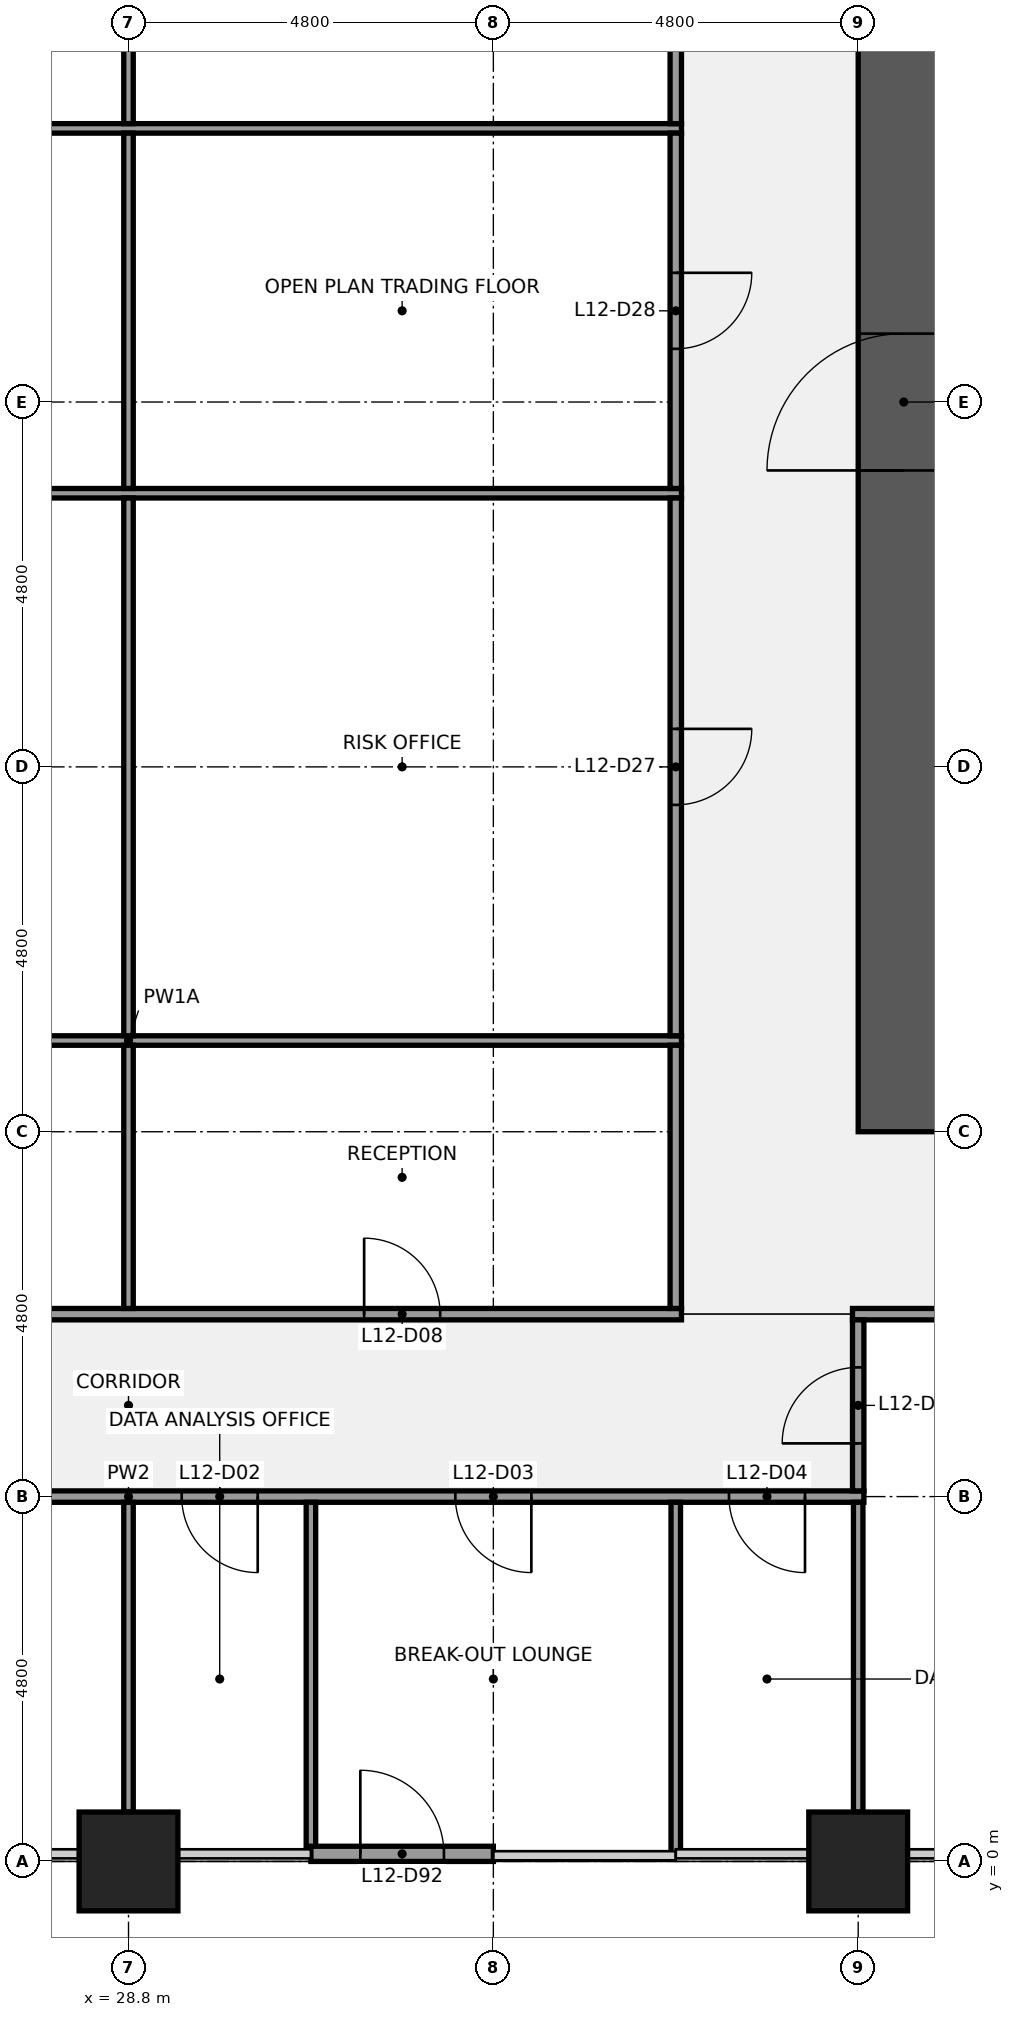
"""IFC4 building model, lengths in metres.
Left out: names, types, materials, properties, quantities, classifications, styles, units other than length and angle.
Written with IfcOpenShell. Run it as: python <this file> out.ifc"""

import sys

from ifc_helpers import new_model, si_unit, direction, frame, frame_2d, origin, origin_2d, place, context, subcontext, project, spatial, rectangle, extrude, element, fill, save


model = new_model("IFC4")
c1 = context("Model", 3, precision=1e-05, world=origin(), true_north=direction((0.0, 1.0)))
c2 = subcontext(c1, "Body", "Model", "MODEL_VIEW")
j1 = project(units=[si_unit("LENGTHUNIT", "METRE"), si_unit("PLANEANGLEUNIT", "RADIAN")], contexts=[c1])
p1 = place(None, origin())
s1 = spatial("IfcSite", under=j1, at=p1, CompositionType="ELEMENT")
p2 = place(p1, origin())
s2 = spatial("IfcBuilding", under=s1, at=p2, CompositionType="ELEMENT")
p3 = place(p2, frame((0.0, 0.0, 59.0)))
s3 = spatial("IfcBuildingStorey", under=s2, at=p3, CompositionType="ELEMENT", Elevation=59.0)
for number, where, z_axis, x_axis in (
    (1, (28.8, 0.0, 0.0), (0.0, 0.0, 1.0), (1.0, 0.0, 0.0)),
    (2, (38.4, 0.0, 0.0), (0.0, 0.0, 1.0), (1.0, 0.0, 0.0)),
):
    element("IfcColumn", number, at=place(p3, frame(where, z_axis=z_axis, x_axis=x_axis)), inside=s3, PredefinedType="COLUMN", context=c2, shape_type="SweptSolid", body=[
        extrude(rectangle(XDim=1.3, YDim=1.3, at=origin_2d()), origin(), (0.0, 0.0, 1.0), 4.0),
    ])
p4 = place(p3, frame((39.0, 9.6, 0.0), z_axis=(0.0, 0.0, 1.0), x_axis=(0.0, 1.0, 0.0)))
e3 = element("IfcWall", 3, at=p4, inside=s3, PredefinedType="SHEAR", context=c2, shape_type="SweptSolid", body=[
    extrude(rectangle(XDim=28.8, YDim=1.2, at=frame_2d((14.4, 0.0))), origin(), (0.0, 0.0, 1.0), 3.84),
])
p5 = place(p4, frame((8.7, 0.0, 0.0)))
e4 = element("IfcOpeningElement", 4, at=p5, cuts=e3, PredefinedType="OPENING", context=c2, shape_type="SweptSolid", body=[
    extrude(rectangle(XDim=1.8, YDim=2.1, at=frame_2d((0.9, 1.05))), frame((0.0, 0.61, 0.0), z_axis=(0.0, -1.0, 0.0), x_axis=(1.0, 0.0, 0.0)), (0.0, 0.0, 1.0), 1.22),
])
p6 = place(p4, frame((18.3, 0.0, 0.0)))
e5 = element("IfcOpeningElement", 5, at=p6, cuts=e3, PredefinedType="OPENING", context=c2, shape_type="SweptSolid", body=[
    extrude(rectangle(XDim=1.8, YDim=2.1, at=frame_2d((0.9, 1.05))), frame((0.0, 0.61, 0.0), z_axis=(0.0, -1.0, 0.0), x_axis=(1.0, 0.0, 0.0)), (0.0, 0.0, 1.0), 1.22),
])
p7 = place(p3, frame((19.125, 4.8, 0.0), z_axis=(0.0, 0.0, 1.0), x_axis=(1.0, 0.0, 0.0)))
e6 = element("IfcWall", 6, at=p7, inside=s3, PredefinedType="PARTITIONING", context=c2, shape_type="SweptSolid", body=[
    extrude(rectangle(XDim=19.35, YDim=0.15, at=frame_2d((9.675, 0.0))), origin(), (0.0, 0.0, 1.0), 2.87),
])
p8 = place(p7, frame((4.375, 0.0, 0.0)))
e7 = element("IfcOpeningElement", 7, at=p8, cuts=e6, PredefinedType="OPENING", context=c2, shape_type="SweptSolid", body=[
    extrude(rectangle(XDim=1.0, YDim=2.1, at=frame_2d((0.5, 1.05))), frame((0.0, 0.085, 0.0), z_axis=(0.0, -1.0, 0.0), x_axis=(1.0, 0.0, 0.0)), (0.0, 0.0, 1.0), 0.17),
])
p9 = place(p7, frame((10.375, 0.0, 0.0)))
e8 = element("IfcOpeningElement", 8, at=p9, cuts=e6, PredefinedType="OPENING", context=c2, shape_type="SweptSolid", body=[
    extrude(rectangle(XDim=1.0, YDim=2.1, at=frame_2d((0.5, 1.05))), frame((0.0, 0.085, 0.0), z_axis=(0.0, -1.0, 0.0), x_axis=(1.0, 0.0, 0.0)), (0.0, 0.0, 1.0), 0.17),
])
p10 = place(p7, frame((13.975, 0.0, 0.0)))
e9 = element("IfcOpeningElement", 9, at=p10, cuts=e6, PredefinedType="OPENING", context=c2, shape_type="SweptSolid", body=[
    extrude(rectangle(XDim=1.0, YDim=2.1, at=frame_2d((0.5, 1.05))), frame((0.0, 0.085, 0.0), z_axis=(0.0, -1.0, 0.0), x_axis=(1.0, 0.0, 0.0)), (0.0, 0.0, 1.0), 0.17),
])
p11 = place(p7, frame((17.575, 0.0, 0.0)))
e10 = element("IfcOpeningElement", 10, at=p11, cuts=e6, PredefinedType="OPENING", context=c2, shape_type="SweptSolid", body=[
    extrude(rectangle(XDim=1.0, YDim=2.1, at=frame_2d((0.5, 1.05))), frame((0.0, 0.085, 0.0), z_axis=(0.0, -1.0, 0.0), x_axis=(1.0, 0.0, 0.0)), (0.0, 0.0, 1.0), 0.17),
])
p12 = place(p3, frame((21.525, 7.2, 0.0), z_axis=(0.0, 0.0, 1.0), x_axis=(1.0, 0.0, 0.0)))
e11 = element("IfcWall", 11, at=p12, inside=s3, PredefinedType="PARTITIONING", context=c2, shape_type="SweptSolid", body=[
    extrude(rectangle(XDim=14.55, YDim=0.15, at=frame_2d((7.275, 0.0))), origin(), (0.0, 0.0, 1.0), 2.87),
])
p13 = place(p12, frame((3.175, 0.0, 0.0)))
e12 = element("IfcOpeningElement", 12, at=p13, cuts=e11, PredefinedType="OPENING", context=c2, shape_type="SweptSolid", body=[
    extrude(rectangle(XDim=1.0, YDim=2.1, at=frame_2d((0.5, 1.05))), frame((0.0, 0.085, 0.0), z_axis=(0.0, -1.0, 0.0), x_axis=(1.0, 0.0, 0.0)), (0.0, 0.0, 1.0), 0.17),
])
p14 = place(p12, frame((10.375, 0.0, 0.0)))
e13 = element("IfcOpeningElement", 13, at=p14, cuts=e11, PredefinedType="OPENING", context=c2, shape_type="SweptSolid", body=[
    extrude(rectangle(XDim=1.0, YDim=2.1, at=frame_2d((0.5, 1.05))), frame((0.0, 0.085, 0.0), z_axis=(0.0, -1.0, 0.0), x_axis=(1.0, 0.0, 0.0)), (0.0, 0.0, 1.0), 0.17),
])
p15 = place(p3, frame((38.325, 7.2, 0.0), z_axis=(0.0, 0.0, 1.0), x_axis=(1.0, 0.0, 0.0)))
e14 = element("IfcWall", 14, at=p15, inside=s3, PredefinedType="PARTITIONING", context=c2, shape_type="SweptSolid", body=[
    extrude(rectangle(XDim=9.75, YDim=0.15, at=frame_2d((4.875, 0.0))), origin(), (0.0, 0.0, 1.0), 2.87),
])
p16 = place(p15, frame((5.575, 0.0, 0.0)))
e15 = element("IfcOpeningElement", 15, at=p16, cuts=e14, PredefinedType="OPENING", context=c2, shape_type="SweptSolid", body=[
    extrude(rectangle(XDim=1.0, YDim=2.1, at=frame_2d((0.5, 1.05))), frame((0.0, 0.085, 0.0), z_axis=(0.0, -1.0, 0.0), x_axis=(1.0, 0.0, 0.0)), (0.0, 0.0, 1.0), 0.17),
])
for number, where, z_axis, x_axis in (
    (16, (21.525, 10.8, 0.0), (0.0, 0.0, 1.0), (1.0, 0.0, 0.0)),
    (17, (21.525, 18.0, 0.0), (0.0, 0.0, 1.0), (1.0, 0.0, 0.0)),
    (18, (21.525, 22.8, 0.0), (0.0, 0.0, 1.0), (1.0, 0.0, 0.0)),
):
    element("IfcWall", number, at=place(p3, frame(where, z_axis=z_axis, x_axis=x_axis)), inside=s3, PredefinedType="PARTITIONING", context=c2, shape_type="SweptSolid", body=[
        extrude(rectangle(XDim=14.55, YDim=0.125, at=frame_2d((7.275, 0.0))), origin(), (0.0, 0.0, 1.0), 2.87),
    ])
p17 = place(p3, frame((28.8, 0.65, 0.0), z_axis=(0.0, 0.0, 1.0), x_axis=(0.0, 1.0, 0.0)))
e19 = element("IfcWall", 19, at=p17, inside=s3, PredefinedType="PARTITIONING", context=c2, shape_type="SweptSolid", body=[
    extrude(rectangle(XDim=4.075, YDim=0.125, at=frame_2d((2.038, 0.0))), origin(), (0.0, 0.0, 1.0), 2.87),
])
p18 = place(p3, frame((28.8, 7.275, 0.0), z_axis=(0.0, 0.0, 1.0), x_axis=(0.0, 1.0, 0.0)))
e20 = element("IfcWall", 20, at=p18, inside=s3, PredefinedType="PARTITIONING", context=c2, shape_type="SweptSolid", body=[
    extrude(rectangle(XDim=3.463, YDim=0.125, at=frame_2d((1.731, 0.0))), origin(), (0.0, 0.0, 1.0), 2.87),
])
p19 = place(p3, frame((28.8, 10.863, 0.0), z_axis=(0.0, 0.0, 1.0), x_axis=(0.0, 1.0, 0.0)))
e21 = element("IfcWall", 21, at=p19, inside=s3, PredefinedType="PARTITIONING", context=c2, shape_type="SweptSolid", body=[
    extrude(rectangle(XDim=7.075, YDim=0.125, at=frame_2d((3.538, 0.0))), origin(), (0.0, 0.0, 1.0), 2.87),
])
p20 = place(p3, frame((28.8, 18.062, 0.0), z_axis=(0.0, 0.0, 1.0), x_axis=(0.0, 1.0, 0.0)))
e22 = element("IfcWall", 22, at=p20, inside=s3, PredefinedType="PARTITIONING", context=c2, shape_type="SweptSolid", body=[
    extrude(rectangle(XDim=4.675, YDim=0.125, at=frame_2d((2.337, 0.0))), origin(), (0.0, 0.0, 1.0), 2.87),
])
p21 = place(p3, frame((28.8, 22.863, 0.0), z_axis=(0.0, 0.0, 1.0), x_axis=(0.0, 1.0, 0.0)))
e23 = element("IfcWall", 23, at=p21, inside=s3, PredefinedType="PARTITIONING", context=c2, shape_type="SweptSolid", body=[
    extrude(rectangle(XDim=7.075, YDim=0.125, at=frame_2d((3.538, 0.0))), origin(), (0.0, 0.0, 1.0), 2.87),
])
for number, where, z_axis, x_axis in (
    (24, (31.2, 0.1, 0.0), (0.0, 0.0, 1.0), (0.0, 1.0, 0.0)),
    (25, (36.0, 0.1, 0.0), (0.0, 0.0, 1.0), (0.0, 1.0, 0.0)),
):
    element("IfcWall", number, at=place(p3, frame(where, z_axis=z_axis, x_axis=x_axis)), inside=s3, PredefinedType="PARTITIONING", context=c2, shape_type="SweptSolid", body=[
        extrude(rectangle(XDim=4.625, YDim=0.125, at=frame_2d((2.312, 0.0))), origin(), (0.0, 0.0, 1.0), 2.87),
    ])
p22 = place(p3, frame((36.0, 7.275, 0.0), z_axis=(0.0, 0.0, 1.0), x_axis=(0.0, 1.0, 0.0)))
e26 = element("IfcWall", 26, at=p22, inside=s3, PredefinedType="PARTITIONING", context=c2, shape_type="SweptSolid", body=[
    extrude(rectangle(XDim=3.463, YDim=0.15, at=frame_2d((1.731, 0.0))), origin(), (0.0, 0.0, 1.0), 2.87),
])
p23 = place(p3, frame((36.0, 10.863, 0.0), z_axis=(0.0, 0.0, 1.0), x_axis=(0.0, 1.0, 0.0)))
e27 = element("IfcWall", 27, at=p23, inside=s3, PredefinedType="PARTITIONING", context=c2, shape_type="SweptSolid", body=[
    extrude(rectangle(XDim=7.075, YDim=0.15, at=frame_2d((3.538, 0.0))), origin(), (0.0, 0.0, 1.0), 2.87),
])
p24 = place(p23, frame((3.038, 0.0, 0.0)))
e28 = element("IfcOpeningElement", 28, at=p24, cuts=e27, PredefinedType="OPENING", context=c2, shape_type="SweptSolid", body=[
    extrude(rectangle(XDim=1.0, YDim=2.1, at=frame_2d((0.5, 1.05))), frame((0.0, 0.085, 0.0), z_axis=(0.0, -1.0, 0.0), x_axis=(1.0, 0.0, 0.0)), (0.0, 0.0, 1.0), 0.17),
])
p25 = place(p3, frame((36.0, 18.062, 0.0), z_axis=(0.0, 0.0, 1.0), x_axis=(0.0, 1.0, 0.0)))
e29 = element("IfcWall", 29, at=p25, inside=s3, PredefinedType="PARTITIONING", context=c2, shape_type="SweptSolid", body=[
    extrude(rectangle(XDim=4.675, YDim=0.15, at=frame_2d((2.337, 0.0))), origin(), (0.0, 0.0, 1.0), 2.87),
])
p26 = place(p25, frame((1.837, 0.0, 0.0)))
e30 = element("IfcOpeningElement", 30, at=p26, cuts=e29, PredefinedType="OPENING", context=c2, shape_type="SweptSolid", body=[
    extrude(rectangle(XDim=1.0, YDim=2.1, at=frame_2d((0.5, 1.05))), frame((0.0, 0.085, 0.0), z_axis=(0.0, -1.0, 0.0), x_axis=(1.0, 0.0, 0.0)), (0.0, 0.0, 1.0), 0.17),
])
p27 = place(p3, frame((36.0, 22.863, 0.0), z_axis=(0.0, 0.0, 1.0), x_axis=(0.0, 1.0, 0.0)))
e31 = element("IfcWall", 31, at=p27, inside=s3, PredefinedType="PARTITIONING", context=c2, shape_type="SweptSolid", body=[
    extrude(rectangle(XDim=7.075, YDim=0.15, at=frame_2d((3.538, 0.0))), origin(), (0.0, 0.0, 1.0), 2.87),
])
p28 = place(p27, frame((3.038, 0.0, 0.0)))
e32 = element("IfcOpeningElement", 32, at=p28, cuts=e31, PredefinedType="OPENING", context=c2, shape_type="SweptSolid", body=[
    extrude(rectangle(XDim=1.0, YDim=2.1, at=frame_2d((0.5, 1.05))), frame((0.0, 0.085, 0.0), z_axis=(0.0, -1.0, 0.0), x_axis=(1.0, 0.0, 0.0)), (0.0, 0.0, 1.0), 0.17),
])
p29 = place(p3, frame((38.4, 0.65, 0.0), z_axis=(0.0, 0.0, 1.0), x_axis=(0.0, 1.0, 0.0)))
e33 = element("IfcWall", 33, at=p29, inside=s3, PredefinedType="PARTITIONING", context=c2, shape_type="SweptSolid", body=[
    extrude(rectangle(XDim=4.075, YDim=0.125, at=frame_2d((2.038, 0.0))), origin(), (0.0, 0.0, 1.0), 2.87),
])
p30 = place(p3, frame((38.4, 4.875, 0.0), z_axis=(0.0, 0.0, 1.0), x_axis=(0.0, 1.0, 0.0)))
e34 = element("IfcWall", 34, at=p30, inside=s3, PredefinedType="PARTITIONING", context=c2, shape_type="SweptSolid", body=[
    extrude(rectangle(XDim=2.25, YDim=0.15, at=frame_2d((1.125, 0.0))), origin(), (0.0, 0.0, 1.0), 2.87),
])
p31 = place(p30, frame((0.625, 0.0, 0.0)))
e35 = element("IfcOpeningElement", 35, at=p31, cuts=e34, PredefinedType="OPENING", context=c2, shape_type="SweptSolid", body=[
    extrude(rectangle(XDim=1.0, YDim=2.1, at=frame_2d((0.5, 1.05))), frame((0.0, 0.085, 0.0), z_axis=(0.0, -1.0, 0.0), x_axis=(1.0, 0.0, 0.0)), (0.0, 0.0, 1.0), 0.17),
])
p32 = place(p3, frame((31.2, 0.1, 0.0), z_axis=(0.0, 0.0, 1.0), x_axis=(1.0, 0.0, 0.0)))
e36 = element("IfcWall", 36, at=p32, inside=s3, PredefinedType="SOLIDWALL", context=c2, shape_type="SweptSolid", body=[
    extrude(rectangle(XDim=2.4, YDim=0.2, at=frame_2d((1.2, 0.0))), origin(), (0.0, 0.0, 1.0), 3.314),
])
p33 = place(p32, frame((0.65, 0.0, 0.0)))
e37 = element("IfcOpeningElement", 37, at=p33, cuts=e36, PredefinedType="OPENING", context=c2, shape_type="SweptSolid", body=[
    extrude(rectangle(XDim=1.1, YDim=2.1, at=frame_2d((0.55, 1.05))), frame((0.0, 0.11, 0.0), z_axis=(0.0, -1.0, 0.0), x_axis=(1.0, 0.0, 0.0)), (0.0, 0.0, 1.0), 0.22),
])
p34 = place(p3, frame((38.4, -1.075, 0.0), z_axis=(0.0, 0.0, 1.0), x_axis=(1.0, 0.0, 0.0)))
e38 = element("IfcColumn", 38, at=p34, inside=s3, PredefinedType="PILASTER", context=c2, shape_type="SweptSolid", body=[
    extrude(rectangle(XDim=4.2, YDim=0.85, at=origin_2d()), origin(), (0.0, 0.0, 1.0), 4.0),
])
p35 = place(p5, origin())
e39 = element("IfcDoor", 39, at=p35, inside=s3, OperationType="DOUBLE_DOOR_SINGLE_SWING", PredefinedType="DOOR", context=c2, shape_type="SweptSolid", body=[
    extrude(rectangle(XDim=1.8, YDim=2.1, at=frame_2d((0.9, 1.05))), frame((0.0, 0.025, 0.0), z_axis=(0.0, -1.0, 0.0), x_axis=(1.0, 0.0, 0.0)), (0.0, 0.0, 1.0), 0.05),
])
fill(e4, e39)
p36 = place(p9, origin())
e40 = element("IfcDoor", 40, at=p36, inside=s3, OperationType="SINGLE_SWING_RIGHT", PredefinedType="DOOR", context=c2, shape_type="SweptSolid", body=[
    extrude(rectangle(XDim=1.0, YDim=2.1, at=frame_2d((0.5, 1.05))), frame((0.0, 0.025, 0.0), z_axis=(0.0, -1.0, 0.0), x_axis=(1.0, 0.0, 0.0)), (0.0, 0.0, 1.0), 0.05),
])
fill(e8, e40)
p37 = place(p10, origin())
e41 = element("IfcDoor", 41, at=p37, inside=s3, OperationType="SINGLE_SWING_RIGHT", PredefinedType="DOOR", context=c2, shape_type="SweptSolid", body=[
    extrude(rectangle(XDim=1.0, YDim=2.1, at=frame_2d((0.5, 1.05))), frame((0.0, 0.025, 0.0), z_axis=(0.0, -1.0, 0.0), x_axis=(1.0, 0.0, 0.0)), (0.0, 0.0, 1.0), 0.05),
])
fill(e9, e41)
p38 = place(p11, origin())
e42 = element("IfcDoor", 42, at=p38, inside=s3, OperationType="SINGLE_SWING_RIGHT", PredefinedType="DOOR", context=c2, shape_type="SweptSolid", body=[
    extrude(rectangle(XDim=1.0, YDim=2.1, at=frame_2d((0.5, 1.05))), frame((0.0, 0.025, 0.0), z_axis=(0.0, -1.0, 0.0), x_axis=(1.0, 0.0, 0.0)), (0.0, 0.0, 1.0), 0.05),
])
fill(e10, e42)
p39 = place(p14, origin())
e43 = element("IfcDoor", 43, at=p39, inside=s3, OperationType="SINGLE_SWING_LEFT", PredefinedType="DOOR", context=c2, shape_type="SweptSolid", body=[
    extrude(rectangle(XDim=1.0, YDim=2.1, at=frame_2d((0.5, 1.05))), frame((0.0, 0.025, 0.0), z_axis=(0.0, -1.0, 0.0), x_axis=(1.0, 0.0, 0.0)), (0.0, 0.0, 1.0), 0.05),
])
fill(e13, e43)
p40 = place(p24, origin())
e44 = element("IfcDoor", 44, at=p40, inside=s3, OperationType="SINGLE_SWING_RIGHT", PredefinedType="DOOR", context=c2, shape_type="SweptSolid", body=[
    extrude(rectangle(XDim=1.0, YDim=2.1, at=frame_2d((0.5, 1.05))), frame((0.0, 0.025, 0.0), z_axis=(0.0, -1.0, 0.0), x_axis=(1.0, 0.0, 0.0)), (0.0, 0.0, 1.0), 0.05),
])
fill(e28, e44)
p41 = place(p26, origin())
e45 = element("IfcDoor", 45, at=p41, inside=s3, OperationType="SINGLE_SWING_RIGHT", PredefinedType="DOOR", context=c2, shape_type="SweptSolid", body=[
    extrude(rectangle(XDim=1.0, YDim=2.1, at=frame_2d((0.5, 1.05))), frame((0.0, 0.025, 0.0), z_axis=(0.0, -1.0, 0.0), x_axis=(1.0, 0.0, 0.0)), (0.0, 0.0, 1.0), 0.05),
])
fill(e30, e45)
p42 = place(p31, origin())
e46 = element("IfcDoor", 46, at=p42, inside=s3, OperationType="SINGLE_SWING_LEFT", PredefinedType="DOOR", context=c2, shape_type="SweptSolid", body=[
    extrude(rectangle(XDim=1.0, YDim=2.1, at=frame_2d((0.5, 1.05))), frame((0.0, 0.025, 0.0), z_axis=(0.0, -1.0, 0.0), x_axis=(1.0, 0.0, 0.0)), (0.0, 0.0, 1.0), 0.05),
])
fill(e35, e46)
p43 = place(p33, origin())
e47 = element("IfcDoor", 47, at=p43, inside=s3, OperationType="SINGLE_SWING_LEFT", PredefinedType="DOOR", context=c2, shape_type="SweptSolid", body=[
    extrude(rectangle(XDim=1.1, YDim=2.1, at=frame_2d((0.55, 1.05))), frame((0.0, 0.025, 0.0), z_axis=(0.0, -1.0, 0.0), x_axis=(1.0, 0.0, 0.0)), (0.0, 0.0, 1.0), 0.05),
])
fill(e37, e47)
save(model, sys.argv[1])
